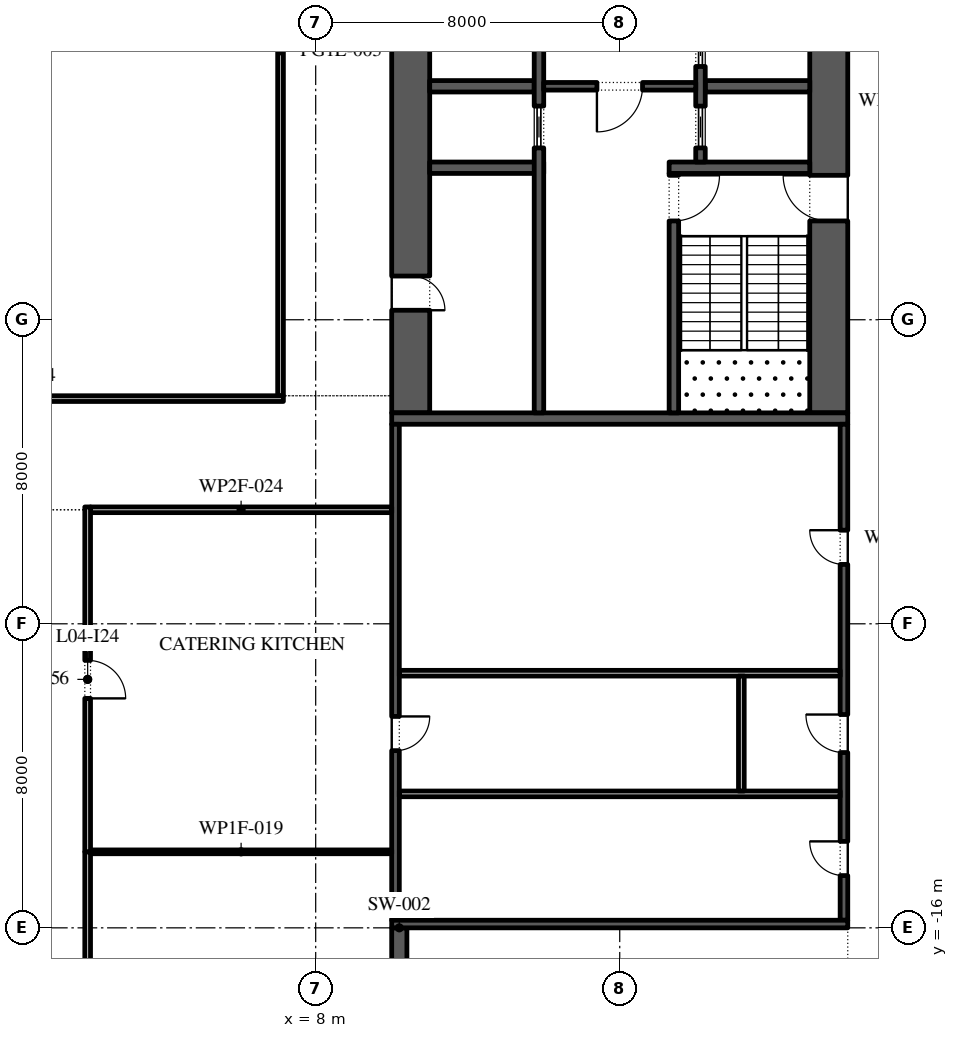
"""IFC4 building model, lengths in metres.
Left out: names, types, materials, properties, quantities, classifications, styles, units other than length and angle.
Written with IfcOpenShell. Run it as: python <this file> out.ifc"""

import sys

from ifc_helpers import new_model, si_unit, direction, frame, frame_2d, origin, place, context, subcontext, project, spatial, rectangle, extrude, element, fill, save


model = new_model("IFC4")
c1 = context("Model", 3, precision=1e-05, world=origin(), true_north=direction((0.0, 1.0)))
c2 = subcontext(c1, "Body", "Model", "MODEL_VIEW")
j1 = project(units=[si_unit("LENGTHUNIT", "METRE"), si_unit("PLANEANGLEUNIT", "RADIAN")], contexts=[c1])
p1 = place(None, origin())
s1 = spatial("IfcSite", under=j1, at=p1, CompositionType="ELEMENT")
p2 = place(p1, origin())
s2 = spatial("IfcBuilding", under=s1, at=p2, CompositionType="ELEMENT")
p3 = place(p2, frame((0.0, 0.0, 24.0)))
s3 = spatial("IfcBuildingStorey", under=s2, at=p3, CompositionType="ELEMENT", Elevation=24.0)
p4 = place(p3, frame((10.2, -31.0, 0.0), z_axis=(0.0, 0.0, 1.0), x_axis=(0.0, 1.0, 0.0)))
e1 = element("IfcWall", 1, at=p4, inside=s3, PredefinedType="SHEAR", context=c2, shape_type="SweptSolid", body=[
    extrude(rectangle(XDim=15.0, YDim=0.4, at=frame_2d((7.5, 0.0))), origin(), (0.0, 0.0, 1.0), 4.5),
])
p5 = place(p3, frame((7.075, 16.15, 0.0), z_axis=(0.0, 0.0, 1.0), x_axis=(0.0, -1.0, 0.0)))
e2 = element("IfcWall", 2, at=p5, inside=s3, PredefinedType="STANDARD", context=c2, shape_type="SweptSolid", body=[
    extrude(rectangle(XDim=18.15, YDim=0.15, at=frame_2d((9.075, 0.0))), origin(), (0.0, 0.0, 1.0), 4.5),
])
p6 = place(p3, frame((7.15, -2.075, 0.0), z_axis=(0.0, 0.0, 1.0), x_axis=(-1.0, 0.0, 0.0)))
e3 = element("IfcWall", 3, at=p6, inside=s3, PredefinedType="STANDARD", context=c2, shape_type="SweptSolid", body=[
    extrude(rectangle(XDim=14.15, YDim=0.15, at=frame_2d((7.075, 0.0))), origin(), (0.0, 0.0, 1.0), 3.52),
])
p7 = place(p3, frame((21.5, -2.45, 0.0), z_axis=(0.0, 0.0, 1.0), x_axis=(0.0, 1.0, 0.0)))
e4 = element("IfcWall", 4, at=p7, inside=s3, PredefinedType="SHEAR", context=c2, shape_type="SweptSolid", body=[
    extrude(rectangle(XDim=27.9, YDim=1.0, at=frame_2d((13.95, 0.0))), origin(), (0.0, 0.0, 1.0), 4.5),
])
p8 = place(p7, frame((5.05, 0.0, 0.0)))
e5 = element("IfcOpeningElement", 5, at=p8, cuts=e4, PredefinedType="OPENING", context=c2, shape_type="SweptSolid", body=[
    extrude(rectangle(XDim=1.2, YDim=2.1, at=frame_2d((0.6, 1.05))), frame((0.0, 0.51, 0.0), z_axis=(0.0, -1.0, 0.0), x_axis=(1.0, 0.0, 0.0)), (0.0, 0.0, 1.0), 1.02),
])
p9 = place(p7, frame((21.65, 0.0, 0.0)))
e6 = element("IfcOpeningElement", 6, at=p9, cuts=e4, PredefinedType="OPENING", context=c2, shape_type="SweptSolid", body=[
    extrude(rectangle(XDim=1.2, YDim=2.1, at=frame_2d((0.6, 1.05))), frame((0.0, 0.51, 0.0), z_axis=(0.0, -1.0, 0.0), x_axis=(1.0, 0.0, 0.0)), (0.0, 0.0, 1.0), 1.02),
])
p10 = place(p3, frame((10.5, -2.45, 0.0), z_axis=(0.0, 0.0, 1.0), x_axis=(0.0, 1.0, 0.0)))
e7 = element("IfcWall", 7, at=p10, inside=s3, PredefinedType="SHEAR", context=c2, shape_type="SweptSolid", body=[
    extrude(rectangle(XDim=27.9, YDim=1.0, at=frame_2d((13.95, 0.0))), origin(), (0.0, 0.0, 1.0), 4.5),
])
p11 = place(p10, frame((23.65, 0.0, 0.0)))
e8 = element("IfcOpeningElement", 8, at=p11, cuts=e7, PredefinedType="OPENING", context=c2, shape_type="SweptSolid", body=[
    extrude(rectangle(XDim=2.4, YDim=2.1, at=frame_2d((1.2, 1.05))), frame((0.0, 0.51, 0.0), z_axis=(0.0, -1.0, 0.0), x_axis=(1.0, 0.0, 0.0)), (0.0, 0.0, 1.0), 1.02),
])
p12 = place(p10, frame((2.7, 0.0, 0.0)))
e9 = element("IfcOpeningElement", 9, at=p12, cuts=e7, PredefinedType="OPENING", context=c2, shape_type="SweptSolid", body=[
    extrude(rectangle(XDim=0.9, YDim=2.1, at=frame_2d((0.45, 1.05))), frame((0.0, 0.51, 0.0), z_axis=(0.0, -1.0, 0.0), x_axis=(1.0, 0.0, 0.0)), (0.0, 0.0, 1.0), 1.02),
])
p13 = place(p3, frame((10.0, -2.6, 0.0), z_axis=(0.0, 0.0, 1.0), x_axis=(1.0, 0.0, 0.0)))
e10 = element("IfcWall", 10, at=p13, inside=s3, PredefinedType="SHEAR", context=c2, shape_type="SweptSolid", body=[
    extrude(rectangle(XDim=12.0, YDim=0.3, at=frame_2d((6.0, 0.0))), origin(), (0.0, 0.0, 1.0), 4.5),
])
p14 = place(p3, frame((17.3, 4.0, 0.0), z_axis=(0.0, 0.0, 1.0), x_axis=(1.0, 0.0, 0.0)))
e11 = element("IfcWall", 11, at=p14, inside=s3, PredefinedType="SHEAR", context=c2, shape_type="SweptSolid", body=[
    extrude(rectangle(XDim=3.7, YDim=0.3, at=frame_2d((1.85, 0.0))), origin(), (0.0, 0.0, 1.0), 4.5),
])
p15 = place(p3, frame((17.425, -2.45, 0.0), z_axis=(0.0, 0.0, 1.0), x_axis=(0.0, 1.0, 0.0)))
e12 = element("IfcWall", 12, at=p15, inside=s3, PredefinedType="SHEAR", context=c2, shape_type="SweptSolid", body=[
    extrude(rectangle(XDim=6.3, YDim=0.25, at=frame_2d((3.15, 0.0))), origin(), (0.0, 0.0, 1.0), 4.5),
])
p16 = place(p15, frame((5.05, 0.0, 0.0)))
e13 = element("IfcOpeningElement", 13, at=p16, cuts=e12, PredefinedType="OPENING", context=c2, shape_type="SweptSolid", body=[
    extrude(rectangle(XDim=1.2, YDim=2.1, at=frame_2d((0.6, 1.05))), frame((0.0, 0.135, 0.0), z_axis=(0.0, -1.0, 0.0), x_axis=(1.0, 0.0, 0.0)), (0.0, 0.0, 1.0), 0.27),
])
p17 = place(p3, frame((18.25, 6.143, 0.0), z_axis=(0.0, 0.0, 1.0), x_axis=(1.0, 0.0, 0.0)))
e14 = element("IfcWall", 14, at=p17, inside=s3, PredefinedType="SHEAR", context=c2, shape_type="SweptSolid", body=[
    extrude(rectangle(XDim=2.75, YDim=0.3, at=frame_2d((1.375, 0.0))), origin(), (0.0, 0.0, 1.0), 4.5),
])
p18 = place(p3, frame((18.125, 4.15, 0.0), z_axis=(0.0, 0.0, 1.0), x_axis=(0.0, 1.0, 0.0)))
e15 = element("IfcWall", 15, at=p18, inside=s3, PredefinedType="SHEAR", context=c2, shape_type="SweptSolid", body=[
    extrude(rectangle(XDim=14.7, YDim=0.25, at=frame_2d((7.35, 0.0))), origin(), (0.0, 0.0, 1.0), 4.5),
])
p19 = place(p18, frame((0.371, 0.0, 0.0)))
e16 = element("IfcOpeningElement", 16, at=p19, cuts=e15, PredefinedType="OPENING", context=c2, shape_type="SweptSolid", body=[
    extrude(rectangle(XDim=1.1, YDim=2.1, at=frame_2d((0.55, 1.05))), frame((0.0, 0.135, 0.0), z_axis=(0.0, -1.0, 0.0), x_axis=(1.0, 0.0, 0.0)), (0.0, 0.0, 1.0), 0.27),
])
p20 = place(p18, frame((2.514, 0.0, 0.0)))
e17 = element("IfcOpeningElement", 17, at=p20, cuts=e15, PredefinedType="OPENING", context=c2, shape_type="SweptSolid", body=[
    extrude(rectangle(XDim=1.1, YDim=2.1, at=frame_2d((0.55, 1.05))), frame((0.0, 0.135, 0.0), z_axis=(0.0, -1.0, 0.0), x_axis=(1.0, 0.0, 0.0)), (0.0, 0.0, 1.0), 0.27),
])
p21 = place(p18, frame((4.657, 0.0, 0.0)))
e18 = element("IfcOpeningElement", 18, at=p21, cuts=e15, PredefinedType="OPENING", context=c2, shape_type="SweptSolid", body=[
    extrude(rectangle(XDim=1.1, YDim=2.1, at=frame_2d((0.55, 1.05))), frame((0.0, 0.135, 0.0), z_axis=(0.0, -1.0, 0.0), x_axis=(1.0, 0.0, 0.0)), (0.0, 0.0, 1.0), 0.27),
])
p22 = place(p18, frame((6.8, 0.0, 0.0)))
e19 = element("IfcOpeningElement", 19, at=p22, cuts=e15, PredefinedType="OPENING", context=c2, shape_type="SweptSolid", body=[
    extrude(rectangle(XDim=1.1, YDim=2.1, at=frame_2d((0.55, 1.05))), frame((0.0, 0.135, 0.0), z_axis=(0.0, -1.0, 0.0), x_axis=(1.0, 0.0, 0.0)), (0.0, 0.0, 1.0), 0.27),
])
p23 = place(p18, frame((8.943, 0.0, 0.0)))
e20 = element("IfcOpeningElement", 20, at=p23, cuts=e15, PredefinedType="OPENING", context=c2, shape_type="SweptSolid", body=[
    extrude(rectangle(XDim=1.1, YDim=2.1, at=frame_2d((0.55, 1.05))), frame((0.0, 0.135, 0.0), z_axis=(0.0, -1.0, 0.0), x_axis=(1.0, 0.0, 0.0)), (0.0, 0.0, 1.0), 0.27),
])
p24 = place(p18, frame((11.086, 0.0, 0.0)))
e21 = element("IfcOpeningElement", 21, at=p24, cuts=e15, PredefinedType="OPENING", context=c2, shape_type="SweptSolid", body=[
    extrude(rectangle(XDim=1.1, YDim=2.1, at=frame_2d((0.55, 1.05))), frame((0.0, 0.135, 0.0), z_axis=(0.0, -1.0, 0.0), x_axis=(1.0, 0.0, 0.0)), (0.0, 0.0, 1.0), 0.27),
])
p25 = place(p18, frame((13.229, 0.0, 0.0)))
e22 = element("IfcOpeningElement", 22, at=p25, cuts=e15, PredefinedType="OPENING", context=c2, shape_type="SweptSolid", body=[
    extrude(rectangle(XDim=1.1, YDim=2.1, at=frame_2d((0.55, 1.05))), frame((0.0, 0.135, 0.0), z_axis=(0.0, -1.0, 0.0), x_axis=(1.0, 0.0, 0.0)), (0.0, 0.0, 1.0), 0.27),
])
p26 = place(p3, frame((11.0, 4.0, 0.0), z_axis=(0.0, 0.0, 1.0), x_axis=(1.0, 0.0, 0.0)))
e23 = element("IfcWall", 23, at=p26, inside=s3, PredefinedType="SHEAR", context=c2, shape_type="SweptSolid", body=[
    extrude(rectangle(XDim=3.0, YDim=0.3, at=frame_2d((1.5, 0.0))), origin(), (0.0, 0.0, 1.0), 4.5),
])
p27 = place(p3, frame((11.0, 6.143, 0.0), z_axis=(0.0, 0.0, 1.0), x_axis=(1.0, 0.0, 0.0)))
e24 = element("IfcWall", 24, at=p27, inside=s3, PredefinedType="SHEAR", context=c2, shape_type="SweptSolid", body=[
    extrude(rectangle(XDim=2.75, YDim=0.3, at=frame_2d((1.375, 0.0))), origin(), (0.0, 0.0, 1.0), 4.5),
])
p28 = place(p3, frame((13.875, -2.45, 0.0), z_axis=(0.0, 0.0, 1.0), x_axis=(0.0, 1.0, 0.0)))
e25 = element("IfcWall", 25, at=p28, inside=s3, PredefinedType="SHEAR", context=c2, shape_type="SweptSolid", body=[
    extrude(rectangle(XDim=21.3, YDim=0.25, at=frame_2d((10.65, 0.0))), origin(), (0.0, 0.0, 1.0), 4.5),
])
p29 = place(p28, frame((10.196, 0.0, 0.0)))
e26 = element("IfcOpeningElement", 26, at=p29, cuts=e25, PredefinedType="OPENING", context=c2, shape_type="SweptSolid", body=[
    extrude(rectangle(XDim=0.9, YDim=2.1, at=frame_2d((0.45, 1.05))), frame((0.0, 0.135, 0.0), z_axis=(0.0, -1.0, 0.0), x_axis=(1.0, 0.0, 0.0)), (0.0, 0.0, 1.0), 0.27),
])
p30 = place(p28, frame((16.475, 0.0, 0.0)))
e27 = element("IfcOpeningElement", 27, at=p30, cuts=e25, PredefinedType="OPENING", context=c2, shape_type="SweptSolid", body=[
    extrude(rectangle(XDim=0.9, YDim=2.1, at=frame_2d((0.45, 1.05))), frame((0.0, 0.135, 0.0), z_axis=(0.0, -1.0, 0.0), x_axis=(1.0, 0.0, 0.0)), (0.0, 0.0, 1.0), 0.27),
])
p31 = place(p28, frame((6.971, 0.0, 0.0)))
e28 = element("IfcOpeningElement", 28, at=p31, cuts=e25, PredefinedType="OPENING", context=c2, shape_type="SweptSolid", body=[
    extrude(rectangle(XDim=1.1, YDim=2.1, at=frame_2d((0.55, 1.05))), frame((0.0, 0.135, 0.0), z_axis=(0.0, -1.0, 0.0), x_axis=(1.0, 0.0, 0.0)), (0.0, 0.0, 1.0), 0.27),
])
p32 = place(p3, frame((14.0, 6.143, 0.0), z_axis=(0.0, 0.0, 1.0), x_axis=(1.0, 0.0, 0.0)))
e29 = element("IfcWall", 29, at=p32, inside=s3, PredefinedType="SHEAR", context=c2, shape_type="SweptSolid", body=[
    extrude(rectangle(XDim=4.0, YDim=0.2, at=frame_2d((2.0, 0.0))), origin(), (0.0, 0.0, 1.0), 4.5),
])
p33 = place(p32, frame((1.4, 0.0, 0.0)))
e30 = element("IfcOpeningElement", 30, at=p33, cuts=e29, PredefinedType="OPENING", context=c2, shape_type="SweptSolid", body=[
    extrude(rectangle(XDim=1.2, YDim=2.1, at=frame_2d((0.6, 1.05))), frame((0.0, 0.11, 0.0), z_axis=(0.0, -1.0, 0.0), x_axis=(1.0, 0.0, 0.0)), (0.0, 0.0, 1.0), 0.22),
])
p34 = place(p3, frame((21.9, -15.8, 0.0), z_axis=(0.0, 0.0, 1.0), x_axis=(0.0, 1.0, 0.0)))
e31 = element("IfcWall", 31, at=p34, inside=s3, PredefinedType="SHEAR", context=c2, shape_type="SweptSolid", body=[
    extrude(rectangle(XDim=13.05, YDim=0.2, at=frame_2d((6.525, 0.0))), origin(), (0.0, 0.0, 1.0), 4.5),
])
p35 = place(p34, frame((1.175, 0.0, 0.0)))
e32 = element("IfcOpeningElement", 32, at=p35, cuts=e31, PredefinedType="OPENING", context=c2, shape_type="SweptSolid", body=[
    extrude(rectangle(XDim=0.9, YDim=2.1, at=frame_2d((0.45, 1.05))), frame((0.0, 0.11, 0.0), z_axis=(0.0, -1.0, 0.0), x_axis=(1.0, 0.0, 0.0)), (0.0, 0.0, 1.0), 0.22),
])
p36 = place(p34, frame((4.413, 0.0, 0.0)))
e33 = element("IfcOpeningElement", 33, at=p36, cuts=e31, PredefinedType="OPENING", context=c2, shape_type="SweptSolid", body=[
    extrude(rectangle(XDim=1.0, YDim=2.1, at=frame_2d((0.5, 1.05))), frame((0.0, 0.11, 0.0), z_axis=(0.0, -1.0, 0.0), x_axis=(1.0, 0.0, 0.0)), (0.0, 0.0, 1.0), 0.22),
])
p37 = place(p34, frame((9.363, 0.0, 0.0)))
e34 = element("IfcOpeningElement", 34, at=p37, cuts=e31, PredefinedType="OPENING", context=c2, shape_type="SweptSolid", body=[
    extrude(rectangle(XDim=0.9, YDim=2.1, at=frame_2d((0.45, 1.05))), frame((0.0, 0.11, 0.0), z_axis=(0.0, -1.0, 0.0), x_axis=(1.0, 0.0, 0.0)), (0.0, 0.0, 1.0), 0.22),
])
p38 = place(p3, frame((10.1, -15.8, 0.0), z_axis=(0.0, 0.0, 1.0), x_axis=(0.0, 1.0, 0.0)))
e35 = element("IfcWall", 35, at=p38, inside=s3, PredefinedType="SHEAR", context=c2, shape_type="SweptSolid", body=[
    extrude(rectangle(XDim=13.05, YDim=0.2, at=frame_2d((6.525, 0.0))), origin(), (0.0, 0.0, 1.0), 4.5),
])
p39 = place(p38, frame((4.462, 0.0, 0.0)))
e36 = element("IfcOpeningElement", 36, at=p39, cuts=e35, PredefinedType="OPENING", context=c2, shape_type="SweptSolid", body=[
    extrude(rectangle(XDim=0.9, YDim=2.1, at=frame_2d((0.45, 1.05))), frame((0.0, 0.11, 0.0), z_axis=(0.0, -1.0, 0.0), x_axis=(1.0, 0.0, 0.0)), (0.0, 0.0, 1.0), 0.22),
])
p40 = place(p3, frame((10.0, -15.9, 0.0), z_axis=(0.0, 0.0, 1.0), x_axis=(1.0, 0.0, 0.0)))
e37 = element("IfcWall", 37, at=p40, inside=s3, PredefinedType="SHEAR", context=c2, shape_type="SweptSolid", body=[
    extrude(rectangle(XDim=12.0, YDim=0.2, at=frame_2d((6.0, 0.0))), origin(), (0.0, 0.0, 1.0), 4.5),
])
for number, where, z_axis, x_axis in (
    (38, (10.2, -9.3, 0.0), (0.0, 0.0, 1.0), (1.0, 0.0, 0.0)),
    (39, (10.2, -12.475, 0.0), (0.0, 0.0, 1.0), (1.0, 0.0, 0.0)),
):
    element("IfcWall", number, at=place(p3, frame(where, z_axis=z_axis, x_axis=x_axis)), inside=s3, PredefinedType="PARTITIONING", context=c2, shape_type="SweptSolid", body=[
        extrude(rectangle(XDim=11.6, YDim=0.15, at=frame_2d((5.8, 0.0))), origin(), (0.0, 0.0, 1.0), 4.5),
    ])
p41 = place(p3, frame((19.2, -12.4, 0.0), z_axis=(0.0, 0.0, 1.0), x_axis=(0.0, 1.0, 0.0)))
e40 = element("IfcWall", 40, at=p41, inside=s3, PredefinedType="PARTITIONING", context=c2, shape_type="SweptSolid", body=[
    extrude(rectangle(XDim=3.025, YDim=0.15, at=frame_2d((1.512, 0.0))), origin(), (0.0, 0.0, 1.0), 4.5),
])
p42 = place(p3, frame((2.075, -14.0, 0.0), z_axis=(0.0, 0.0, 1.0), x_axis=(1.0, 0.0, 0.0)))
e41 = element("IfcWall", 41, at=p42, inside=s3, PredefinedType="PARTITIONING", context=c2, shape_type="SweptSolid", body=[
    extrude(rectangle(XDim=7.925, YDim=0.1, at=frame_2d((3.962, 0.0))), origin(), (0.0, 0.0, 1.0), 4.5),
])
p43 = place(p3, frame((2.075, -5.0, 0.0), z_axis=(0.0, 0.0, 1.0), x_axis=(1.0, 0.0, 0.0)))
e42 = element("IfcWall", 42, at=p43, inside=s3, PredefinedType="PARTITIONING", context=c2, shape_type="SweptSolid", body=[
    extrude(rectangle(XDim=7.925, YDim=0.15, at=frame_2d((3.962, 0.0))), origin(), (0.0, 0.0, 1.0), 4.5),
])
p44 = place(p3, frame((2.0, -28.575, 0.0), z_axis=(0.0, 0.0, 1.0), x_axis=(0.0, 1.0, 0.0)))
e43 = element("IfcWall", 43, at=p44, inside=s3, PredefinedType="PARTITIONING", context=c2, shape_type="SweptSolid", body=[
    extrude(rectangle(XDim=14.575, YDim=0.15, at=frame_2d((7.288, 0.0))), origin(), (0.0, 0.0, 1.0), 4.5),
])
p45 = place(p44, frame((6.788, 0.0, 0.0)))
e44 = element("IfcOpeningElement", 44, at=p45, cuts=e43, PredefinedType="OPENING", context=c2, shape_type="SweptSolid", body=[
    extrude(rectangle(XDim=1.0, YDim=2.1, at=frame_2d((0.5, 1.05))), frame((0.0, 0.085, 0.0), z_axis=(0.0, -1.0, 0.0), x_axis=(1.0, 0.0, 0.0)), (0.0, 0.0, 1.0), 0.17),
])
p46 = place(p3, frame((2.0, -14.0, 0.0), z_axis=(0.0, 0.0, 1.0), x_axis=(0.0, 1.0, 0.0)))
e45 = element("IfcWall", 45, at=p46, inside=s3, PredefinedType="PARTITIONING", context=c2, shape_type="SweptSolid", body=[
    extrude(rectangle(XDim=9.075, YDim=0.15, at=frame_2d((4.538, 0.0))), origin(), (0.0, 0.0, 1.0), 4.5),
])
p47 = place(p46, frame((4.038, 0.0, 0.0)))
e46 = element("IfcOpeningElement", 46, at=p47, cuts=e45, PredefinedType="OPENING", context=c2, shape_type="SweptSolid", body=[
    extrude(rectangle(XDim=1.0, YDim=2.1, at=frame_2d((0.5, 1.05))), frame((0.0, 0.085, 0.0), z_axis=(0.0, -1.0, 0.0), x_axis=(1.0, 0.0, 0.0)), (0.0, 0.0, 1.0), 0.17),
])
p48 = place(p19, origin())
e47 = element("IfcDoor", 47, at=p48, inside=s3, OperationType="SLIDING_TO_LEFT", PredefinedType="DOOR", context=c2, shape_type="SweptSolid", body=[
    extrude(rectangle(XDim=1.1, YDim=2.1, at=frame_2d((0.55, 1.05))), frame((0.0, 0.025, 0.0), z_axis=(0.0, -1.0, 0.0), x_axis=(1.0, 0.0, 0.0)), (0.0, 0.0, 1.0), 0.05),
])
fill(e16, e47)
p49 = place(p20, origin())
e48 = element("IfcDoor", 48, at=p49, inside=s3, OperationType="SLIDING_TO_LEFT", PredefinedType="DOOR", context=c2, shape_type="SweptSolid", body=[
    extrude(rectangle(XDim=1.1, YDim=2.1, at=frame_2d((0.55, 1.05))), frame((0.0, 0.025, 0.0), z_axis=(0.0, -1.0, 0.0), x_axis=(1.0, 0.0, 0.0)), (0.0, 0.0, 1.0), 0.05),
])
fill(e17, e48)
p50 = place(p31, origin())
e49 = element("IfcDoor", 49, at=p50, inside=s3, OperationType="SLIDING_TO_LEFT", PredefinedType="DOOR", context=c2, shape_type="SweptSolid", body=[
    extrude(rectangle(XDim=1.1, YDim=2.1, at=frame_2d((0.55, 1.05))), frame((0.0, 0.025, 0.0), z_axis=(0.0, -1.0, 0.0), x_axis=(1.0, 0.0, 0.0)), (0.0, 0.0, 1.0), 0.05),
])
fill(e28, e49)
p51 = place(p33, frame((1.2, 0.0, 0.0), z_axis=(0.0, 0.0, 1.0), x_axis=(-1.0, 0.0, 0.0)))
e50 = element("IfcDoor", 50, at=p51, inside=s3, OperationType="SINGLE_SWING_LEFT", PredefinedType="DOOR", context=c2, shape_type="SweptSolid", body=[
    extrude(rectangle(XDim=1.2, YDim=2.1, at=frame_2d((0.6, 1.05))), frame((0.0, 0.025, 0.0), z_axis=(0.0, -1.0, 0.0), x_axis=(1.0, 0.0, 0.0)), (0.0, 0.0, 1.0), 0.05),
])
fill(e30, e50)
p52 = place(p16, frame((1.2, 0.0, 0.0), z_axis=(0.0, 0.0, 1.0), x_axis=(-1.0, 0.0, 0.0)))
e51 = element("IfcDoor", 51, at=p52, inside=s3, OperationType="SINGLE_SWING_RIGHT", PredefinedType="DOOR", context=c2, shape_type="SweptSolid", body=[
    extrude(rectangle(XDim=1.2, YDim=2.1, at=frame_2d((0.6, 1.05))), frame((0.0, 0.025, 0.0), z_axis=(0.0, -1.0, 0.0), x_axis=(1.0, 0.0, 0.0)), (0.0, 0.0, 1.0), 0.05),
])
fill(e13, e51)
p53 = place(p8, origin())
e52 = element("IfcDoor", 52, at=p53, inside=s3, OperationType="SINGLE_SWING_LEFT", PredefinedType="DOOR", context=c2, shape_type="SweptSolid", body=[
    extrude(rectangle(XDim=1.2, YDim=2.1, at=frame_2d((0.6, 1.05))), frame((0.0, 0.025, 0.0), z_axis=(0.0, -1.0, 0.0), x_axis=(1.0, 0.0, 0.0)), (0.0, 0.0, 1.0), 0.05),
])
fill(e5, e52)
p54 = place(p12, frame((0.9, -0.95, 0.0), z_axis=(0.0, 0.0, 1.0), x_axis=(-1.0, 0.0, 0.0)))
e53 = element("IfcDoor", 53, at=p54, inside=s3, OperationType="SINGLE_SWING_LEFT", PredefinedType="DOOR", context=c2, shape_type="SweptSolid", body=[
    extrude(rectangle(XDim=0.9, YDim=2.1, at=frame_2d((0.45, 1.05))), frame((0.0, -0.45, 0.0), z_axis=(0.0, -1.0, 0.0), x_axis=(1.0, 0.0, 0.0)), (0.0, 0.0, 1.0), 0.05),
])
fill(e9, e53)
p55 = place(p35, origin())
e54 = element("IfcDoor", 54, at=p55, inside=s3, OperationType="SINGLE_SWING_LEFT", PredefinedType="DOOR", context=c2, shape_type="SweptSolid", body=[
    extrude(rectangle(XDim=0.9, YDim=2.1, at=frame_2d((0.45, 1.05))), frame((0.0, 0.1, 0.0), z_axis=(0.0, -1.0, 0.0), x_axis=(1.0, 0.0, 0.0)), (0.0, 0.0, 1.0), 0.05),
])
fill(e32, e54)
p56 = place(p36, origin())
e55 = element("IfcDoor", 55, at=p56, inside=s3, OperationType="SINGLE_SWING_LEFT", PredefinedType="DOOR", context=c2, shape_type="SweptSolid", body=[
    extrude(rectangle(XDim=1.0, YDim=2.1, at=frame_2d((0.5, 1.05))), frame((0.0, 0.1, 0.0), z_axis=(0.0, -1.0, 0.0), x_axis=(1.0, 0.0, 0.0)), (0.0, 0.0, 1.0), 0.05),
])
fill(e33, e55)
p57 = place(p39, frame((0.9, -0.15, 0.0), z_axis=(0.0, 0.0, 1.0), x_axis=(-1.0, 0.0, 0.0)))
e56 = element("IfcDoor", 56, at=p57, inside=s3, OperationType="SINGLE_SWING_RIGHT", PredefinedType="DOOR", context=c2, shape_type="SweptSolid", body=[
    extrude(rectangle(XDim=0.9, YDim=2.1, at=frame_2d((0.45, 1.05))), frame((0.0, -0.05, 0.0), z_axis=(0.0, -1.0, 0.0), x_axis=(1.0, 0.0, 0.0)), (0.0, 0.0, 1.0), 0.05),
])
fill(e36, e56)
p58 = place(p37, origin())
e57 = element("IfcDoor", 57, at=p58, inside=s3, OperationType="SINGLE_SWING_LEFT", PredefinedType="DOOR", context=c2, shape_type="SweptSolid", body=[
    extrude(rectangle(XDim=0.9, YDim=2.1, at=frame_2d((0.45, 1.05))), frame((0.0, 0.1, 0.0), z_axis=(0.0, -1.0, 0.0), x_axis=(1.0, 0.0, 0.0)), (0.0, 0.0, 1.0), 0.05),
])
fill(e34, e57)
p59 = place(p47, frame((1.0, 0.0, 0.0), z_axis=(0.0, 0.0, 1.0), x_axis=(-1.0, 0.0, 0.0)))
e58 = element("IfcDoor", 58, at=p59, inside=s3, OperationType="SINGLE_SWING_LEFT", PredefinedType="DOOR", context=c2, shape_type="SweptSolid", body=[
    extrude(rectangle(XDim=1.0, YDim=2.1, at=frame_2d((0.5, 1.05))), frame((0.0, 0.025, 0.0), z_axis=(0.0, -1.0, 0.0), x_axis=(1.0, 0.0, 0.0)), (0.0, 0.0, 1.0), 0.05),
])
fill(e46, e58)
save(model, sys.argv[1])
